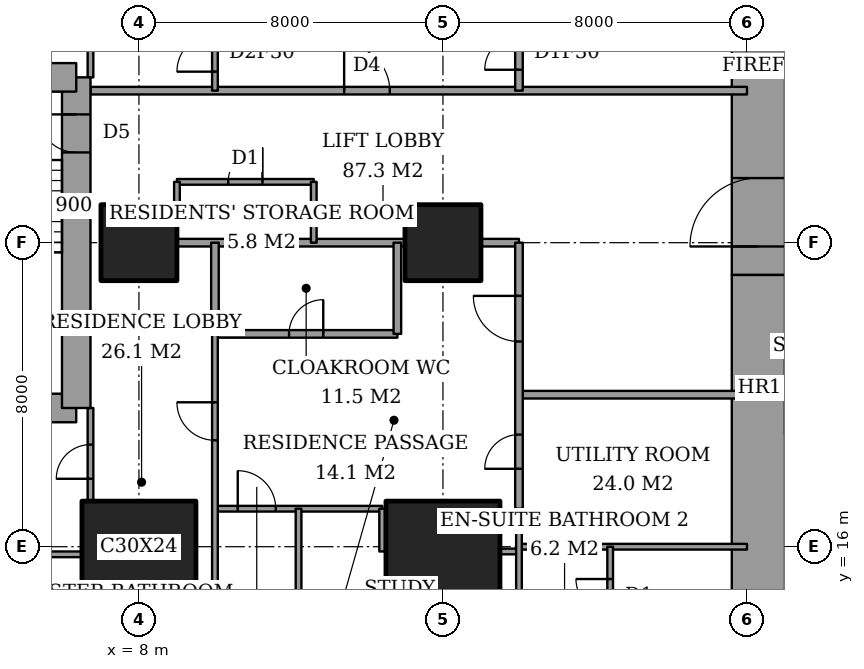
"""IFC4 building model, lengths in metres.
Left out: names, types, materials, properties, quantities, classifications, styles, units other than length and angle.
Written with IfcOpenShell. Run it as: python <this file> out.ifc"""

import sys

from ifc_helpers import new_model, si_unit, direction, frame, frame_2d, origin, origin_2d, place, context, subcontext, project, spatial, rectangle, extrude, element, fill, save


model = new_model("IFC4")
c1 = context("Model", 3, precision=1e-05, world=origin(), true_north=direction((0.0, 1.0)))
c2 = subcontext(c1, "Body", "Model", "MODEL_VIEW")
j1 = project(units=[si_unit("LENGTHUNIT", "METRE"), si_unit("PLANEANGLEUNIT", "RADIAN")], contexts=[c1])
p1 = place(None, origin())
s1 = spatial("IfcSite", under=j1, at=p1, CompositionType="ELEMENT")
p2 = place(p1, origin())
s2 = spatial("IfcBuilding", under=s1, at=p2, CompositionType="ELEMENT")
p3 = place(p2, frame((0.0, 0.0, 153.8)))
s3 = spatial("IfcBuildingStorey", under=s2, at=p3, CompositionType="ELEMENT", Elevation=153.8)
p4 = place(p3, frame((8.0, 16.0, 0.0), z_axis=(0.0, 0.0, 1.0), x_axis=(1.0, 0.0, 0.0)))
e1 = element("IfcColumn", 1, at=p4, inside=s3, PredefinedType="COLUMN", context=c2, shape_type="SweptSolid", body=[
    extrude(rectangle(XDim=3.0, YDim=2.4, at=origin_2d()), origin(), (0.0, 0.0, 1.0), 3.6),
])
p5 = place(p3, frame((8.0, 24.0, 0.0), z_axis=(0.0, 0.0, 1.0), x_axis=(1.0, 0.0, 0.0)))
e2 = element("IfcColumn", 2, at=p5, inside=s3, PredefinedType="COLUMN", context=c2, shape_type="SweptSolid", body=[
    extrude(rectangle(XDim=2.0, YDim=2.0, at=origin_2d()), origin(), (0.0, 0.0, 1.0), 3.6),
])
p6 = place(p3, frame((16.0, 16.0, 0.0), z_axis=(0.0, 0.0, 1.0), x_axis=(1.0, 0.0, 0.0)))
e3 = element("IfcColumn", 3, at=p6, inside=s3, PredefinedType="COLUMN", context=c2, shape_type="SweptSolid", body=[
    extrude(rectangle(XDim=3.0, YDim=2.4, at=origin_2d()), origin(), (0.0, 0.0, 1.0), 3.6),
])
p7 = place(p3, frame((16.0, 24.0, 0.0), z_axis=(0.0, 0.0, 1.0), x_axis=(1.0, 0.0, 0.0)))
e4 = element("IfcColumn", 4, at=p7, inside=s3, PredefinedType="COLUMN", context=c2, shape_type="SweptSolid", body=[
    extrude(rectangle(XDim=2.0, YDim=2.0, at=origin_2d()), origin(), (0.0, 0.0, 1.0), 3.6),
])
p8 = place(p3, frame((24.3, 13.0, 0.0), z_axis=(0.0, 0.0, 1.0), x_axis=(0.0, 1.0, 0.0)))
e5 = element("IfcWall", 5, at=p8, inside=s3, PredefinedType="SHEAR", context=c2, shape_type="SweptSolid", body=[
    extrude(rectangle(XDim=10.15, YDim=1.4, at=frame_2d((5.075, 0.0))), origin(), (0.0, 0.0, 1.0), 3.6),
])
p9 = place(p3, frame((24.3, 23.15, 0.0), z_axis=(0.0, 0.0, 1.0), x_axis=(0.0, 1.0, 0.0)))
e6 = element("IfcWall", 6, at=p9, inside=s3, PredefinedType="SHEAR", context=c2, shape_type="SweptSolid", body=[
    extrude(rectangle(XDim=11.85, YDim=1.4, at=frame_2d((5.925, 0.0))), origin(), (0.0, 0.0, 1.0), 3.6),
])
p10 = place(p9, frame((0.75, 0.0, 0.0)))
e7 = element("IfcOpeningElement", 7, at=p10, cuts=e6, PredefinedType="OPENING", context=c2, shape_type="SweptSolid", body=[
    extrude(rectangle(XDim=1.8, YDim=2.4, at=frame_2d((0.9, 1.2))), frame((0.0, 0.71, 0.0), z_axis=(0.0, -1.0, 0.0), x_axis=(1.0, 0.0, 0.0)), (0.0, 0.0, 1.0), 1.42),
])
p11 = place(p3, frame((1.9, 19.65, 0.0), z_axis=(0.0, 0.0, 1.0), x_axis=(1.0, 0.0, 0.0)))
e8 = element("IfcWall", 8, at=p11, inside=s3, PredefinedType="SHEAR", context=c2, shape_type="SweptSolid", body=[
    extrude(rectangle(XDim=4.45, YDim=0.75, at=frame_2d((2.225, 0.0))), origin(), (0.0, 0.0, 1.0), 3.6),
])
p12 = place(p3, frame((6.35, 19.65, 0.0), z_axis=(0.0, 0.0, 1.0), x_axis=(0.0, 1.0, 0.0)))
e9 = element("IfcWall", 9, at=p12, inside=s3, PredefinedType="SHEAR", context=c2, shape_type="SweptSolid", body=[
    extrude(rectangle(XDim=8.7, YDim=0.75, at=frame_2d((4.35, 0.0))), origin(), (0.0, 0.0, 1.0), 3.6),
])
p13 = place(p12, frame((6.725, 0.0, 0.0)))
e10 = element("IfcOpeningElement", 10, at=p13, cuts=e9, PredefinedType="OPENING", context=c2, shape_type="SweptSolid", body=[
    extrude(rectangle(XDim=1.0, YDim=2.1, at=frame_2d((0.5, 1.05))), frame((0.0, 0.385, 0.0), z_axis=(0.0, -1.0, 0.0), x_axis=(1.0, 0.0, 0.0)), (0.0, 0.0, 1.0), 0.77),
])
p14 = place(p3, frame((6.35, 28.35, 0.0), z_axis=(0.0, 0.0, 1.0), x_axis=(-1.0, 0.0, 0.0)))
e11 = element("IfcWall", 11, at=p14, inside=s3, PredefinedType="SHEAR", context=c2, shape_type="SweptSolid", body=[
    extrude(rectangle(XDim=4.45, YDim=0.75, at=frame_2d((2.225, 0.0))), origin(), (0.0, 0.0, 1.0), 3.6),
])
p15 = place(p3, frame((1.35, 15.8, 0.0), z_axis=(0.0, 0.0, 1.0), x_axis=(1.0, 0.0, 0.0)))
e12 = element("IfcWall", 12, at=p15, inside=s3, PredefinedType="PARTITIONING", context=c2, shape_type="SweptSolid", body=[
    extrude(rectangle(XDim=5.15, YDim=0.15, at=frame_2d((2.575, 0.0))), origin(), (0.0, 0.0, 1.0), 3.35),
])
p16 = place(p3, frame((17.5, 15.875, 0.0), z_axis=(0.0, 0.0, 1.0), x_axis=(1.0, 0.0, 0.0)))
e13 = element("IfcWall", 13, at=p16, inside=s3, PredefinedType="PARTITIONING", context=c2, shape_type="SweptSolid", body=[
    extrude(rectangle(XDim=0.5, YDim=0.15, at=frame_2d((0.25, 0.0))), origin(), (0.0, 0.0, 1.0), 2.634),
])
p17 = place(p3, frame((18.0, 16.0, 0.0), z_axis=(0.0, 0.0, 1.0), x_axis=(1.0, 0.0, 0.0)))
e14 = element("IfcWall", 14, at=p17, inside=s3, PredefinedType="PARTITIONING", context=c2, shape_type="SweptSolid", body=[
    extrude(rectangle(XDim=6.0, YDim=0.15, at=frame_2d((3.0, 0.0))), origin(), (0.0, 0.0, 1.0), 2.634),
])
p18 = place(p3, frame((10.0, 17.0, 0.0), z_axis=(0.0, 0.0, 1.0), x_axis=(1.0, 0.0, 0.0)))
e15 = element("IfcWall", 15, at=p18, inside=s3, PredefinedType="PARTITIONING", context=c2, shape_type="SweptSolid", body=[
    extrude(rectangle(XDim=4.4, YDim=0.15, at=frame_2d((2.2, 0.0))), origin(), (0.0, 0.0, 1.0), 3.35),
])
p19 = place(p18, frame((0.6, 0.0, 0.0)))
e16 = element("IfcOpeningElement", 16, at=p19, cuts=e15, PredefinedType="OPENING", context=c2, shape_type="SweptSolid", body=[
    extrude(rectangle(XDim=1.0, YDim=2.1, at=frame_2d((0.5, 1.05))), frame((0.0, 0.085, 0.0), z_axis=(0.0, -1.0, 0.0), x_axis=(1.0, 0.0, 0.0)), (0.0, 0.0, 1.0), 0.17),
])
p20 = place(p3, frame((18.0, 20.0, 0.0), z_axis=(0.0, 0.0, 1.0), x_axis=(1.0, 0.0, 0.0)))
e17 = element("IfcWall", 17, at=p20, inside=s3, PredefinedType="PARTITIONING", context=c2, shape_type="SweptSolid", body=[
    extrude(rectangle(XDim=6.0, YDim=0.2, at=frame_2d((3.0, 0.0))), origin(), (0.0, 0.0, 1.0), 3.35),
])
p21 = place(p3, frame((10.0, 21.6, 0.0), z_axis=(0.0, 0.0, 1.0), x_axis=(1.0, 0.0, 0.0)))
e18 = element("IfcWall", 18, at=p21, inside=s3, PredefinedType="PARTITIONING", context=c2, shape_type="SweptSolid", body=[
    extrude(rectangle(XDim=4.8, YDim=0.2, at=frame_2d((2.4, 0.0))), origin(), (0.0, 0.0, 1.0), 3.35),
])
p22 = place(p21, frame((1.95, 0.0, 0.0)))
e19 = element("IfcOpeningElement", 19, at=p22, cuts=e18, PredefinedType="OPENING", context=c2, shape_type="SweptSolid", body=[
    extrude(rectangle(XDim=0.9, YDim=2.1, at=frame_2d((0.45, 1.05))), frame((0.0, 0.11, 0.0), z_axis=(0.0, -1.0, 0.0), x_axis=(1.0, 0.0, 0.0)), (0.0, 0.0, 1.0), 0.22),
])
p23 = place(p3, frame((9.0, 24.0, 0.0), z_axis=(0.0, 0.0, 1.0), x_axis=(1.0, 0.0, 0.0)))
e20 = element("IfcWall", 20, at=p23, inside=s3, PredefinedType="PARTITIONING", context=c2, shape_type="SweptSolid", body=[
    extrude(rectangle(XDim=6.0, YDim=0.2, at=frame_2d((3.0, 0.0))), origin(), (0.0, 0.0, 1.0), 3.35),
])
p24 = place(p3, frame((17.0, 24.0, 0.0), z_axis=(0.0, 0.0, 1.0), x_axis=(1.0, 0.0, 0.0)))
e21 = element("IfcWall", 21, at=p24, inside=s3, PredefinedType="PARTITIONING", context=c2, shape_type="SweptSolid", body=[
    extrude(rectangle(XDim=1.0, YDim=0.2, at=frame_2d((0.5, 0.0))), origin(), (0.0, 0.0, 1.0), 3.35),
])
p25 = place(p3, frame((9.0, 25.6, 0.0), z_axis=(0.0, 0.0, 1.0), x_axis=(1.0, 0.0, 0.0)))
e22 = element("IfcWall", 22, at=p25, inside=s3, PredefinedType="PARTITIONING", context=c2, shape_type="SweptSolid", body=[
    extrude(rectangle(XDim=3.6, YDim=0.15, at=frame_2d((1.8, 0.0))), origin(), (0.0, 0.0, 1.0), 3.35),
])
p26 = place(p25, frame((1.35, 0.0, 0.0)))
e23 = element("IfcOpeningElement", 23, at=p26, cuts=e22, PredefinedType="OPENING", context=c2, shape_type="SweptSolid", body=[
    extrude(rectangle(XDim=0.9, YDim=2.1, at=frame_2d((0.45, 1.05))), frame((0.0, 0.085, 0.0), z_axis=(0.0, -1.0, 0.0), x_axis=(1.0, 0.0, 0.0)), (0.0, 0.0, 1.0), 0.17),
])
p27 = place(p3, frame((6.725, 28.0, 0.0), z_axis=(0.0, 0.0, 1.0), x_axis=(1.0, 0.0, 0.0)))
e24 = element("IfcWall", 24, at=p27, inside=s3, PredefinedType="PARTITIONING", context=c2, shape_type="SweptSolid", body=[
    extrude(rectangle(XDim=17.275, YDim=0.2, at=frame_2d((8.637, 0.0))), origin(), (0.0, 0.0, 1.0), 3.35),
])
p28 = place(p27, frame((6.675, 0.0, 0.0)))
e25 = element("IfcOpeningElement", 25, at=p28, cuts=e24, PredefinedType="OPENING", context=c2, shape_type="SweptSolid", body=[
    extrude(rectangle(XDim=1.2, YDim=2.4, at=frame_2d((0.6, 1.2))), frame((0.0, 0.11, 0.0), z_axis=(0.0, -1.0, 0.0), x_axis=(1.0, 0.0, 0.0)), (0.0, 0.0, 1.0), 0.22),
])
p29 = place(p3, frame((6.725, 17.2, 0.0), z_axis=(0.0, 0.0, 1.0), x_axis=(0.0, 1.0, 0.0)))
e26 = element("IfcWall", 26, at=p29, inside=s3, PredefinedType="PARTITIONING", context=c2, shape_type="SweptSolid", body=[
    extrude(rectangle(XDim=2.45, YDim=0.15, at=frame_2d((1.225, 0.0))), origin(), (0.0, 0.0, 1.0), 3.35),
])
p30 = place(p29, frame((0.587, 0.0, 0.0)))
e27 = element("IfcOpeningElement", 27, at=p30, cuts=e26, PredefinedType="OPENING", context=c2, shape_type="SweptSolid", body=[
    extrude(rectangle(XDim=0.9, YDim=2.1, at=frame_2d((0.45, 1.05))), frame((0.0, 0.085, 0.0), z_axis=(0.0, -1.0, 0.0), x_axis=(1.0, 0.0, 0.0)), (0.0, 0.0, 1.0), 0.17),
])
p31 = place(p3, frame((6.725, 28.35, 0.0), z_axis=(0.0, 0.0, 1.0), x_axis=(0.0, 1.0, 0.0)))
e28 = element("IfcWall", 28, at=p31, inside=s3, PredefinedType="PARTITIONING", context=c2, shape_type="SweptSolid", body=[
    extrude(rectangle(XDim=2.45, YDim=0.15, at=frame_2d((1.225, 0.0))), origin(), (0.0, 0.0, 1.0), 3.35),
])
p32 = place(p31, frame((0.913, 0.0, 0.0)))
e29 = element("IfcOpeningElement", 29, at=p32, cuts=e28, PredefinedType="OPENING", context=c2, shape_type="SweptSolid", body=[
    extrude(rectangle(XDim=1.0, YDim=2.1, at=frame_2d((0.5, 1.05))), frame((0.0, 0.085, 0.0), z_axis=(0.0, -1.0, 0.0), x_axis=(1.0, 0.0, 0.0)), (0.0, 0.0, 1.0), 0.17),
])
p33 = place(p3, frame((9.0, 25.0, 0.0), z_axis=(0.0, 0.0, 1.0), x_axis=(0.0, 1.0, 0.0)))
e30 = element("IfcWall", 30, at=p33, inside=s3, PredefinedType="PARTITIONING", context=c2, shape_type="SweptSolid", body=[
    extrude(rectangle(XDim=0.6, YDim=0.15, at=frame_2d((0.3, 0.0))), origin(), (0.0, 0.0, 1.0), 3.35),
])
p34 = place(p3, frame((10.0, 21.6, 0.0), z_axis=(0.0, 0.0, 1.0), x_axis=(0.0, 1.0, 0.0)))
e31 = element("IfcWall", 31, at=p34, inside=s3, PredefinedType="PARTITIONING", context=c2, shape_type="SweptSolid", body=[
    extrude(rectangle(XDim=2.4, YDim=0.2, at=frame_2d((1.2, 0.0))), origin(), (0.0, 0.0, 1.0), 3.35),
])
p35 = place(p3, frame((10.0, 14.0, 0.0), z_axis=(0.0, 0.0, 1.0), x_axis=(0.0, 1.0, 0.0)))
e32 = element("IfcWall", 32, at=p35, inside=s3, PredefinedType="PARTITIONING", context=c2, shape_type="SweptSolid", body=[
    extrude(rectangle(XDim=7.6, YDim=0.15, at=frame_2d((3.8, 0.0))), origin(), (0.0, 0.0, 1.0), 3.35),
])
p36 = place(p35, frame((4.8, 0.0, 0.0)))
e33 = element("IfcOpeningElement", 33, at=p36, cuts=e32, PredefinedType="OPENING", context=c2, shape_type="SweptSolid", body=[
    extrude(rectangle(XDim=1.0, YDim=2.1, at=frame_2d((0.5, 1.05))), frame((0.0, 0.085, 0.0), z_axis=(0.0, -1.0, 0.0), x_axis=(1.0, 0.0, 0.0)), (0.0, 0.0, 1.0), 0.17),
])
p37 = place(p3, frame((10.0, 28.0, 0.0), z_axis=(0.0, 0.0, 1.0), x_axis=(0.0, 1.0, 0.0)))
e34 = element("IfcWall", 34, at=p37, inside=s3, PredefinedType="PARTITIONING", context=c2, shape_type="SweptSolid", body=[
    extrude(rectangle(XDim=9.4, YDim=0.15, at=frame_2d((4.7, 0.0))), origin(), (0.0, 0.0, 1.0), 3.35),
])
p38 = place(p37, frame((0.5, 0.0, 0.0)))
e35 = element("IfcOpeningElement", 35, at=p38, cuts=e34, PredefinedType="OPENING", context=c2, shape_type="SweptSolid", body=[
    extrude(rectangle(XDim=1.0, YDim=2.1, at=frame_2d((0.5, 1.05))), frame((0.0, 0.085, 0.0), z_axis=(0.0, -1.0, 0.0), x_axis=(1.0, 0.0, 0.0)), (0.0, 0.0, 1.0), 0.17),
])
p39 = place(p3, frame((12.2, 10.6, 0.0), z_axis=(0.0, 0.0, 1.0), x_axis=(0.0, 1.0, 0.0)))
e36 = element("IfcWall", 36, at=p39, inside=s3, PredefinedType="PARTITIONING", context=c2, shape_type="SweptSolid", body=[
    extrude(rectangle(XDim=6.4, YDim=0.15, at=frame_2d((3.2, 0.0))), origin(), (0.0, 0.0, 1.0), 3.35),
])
p40 = place(p3, frame((12.6, 24.0, 0.0), z_axis=(0.0, 0.0, 1.0), x_axis=(0.0, 1.0, 0.0)))
e37 = element("IfcWall", 37, at=p40, inside=s3, PredefinedType="PARTITIONING", context=c2, shape_type="SweptSolid", body=[
    extrude(rectangle(XDim=1.6, YDim=0.15, at=frame_2d((0.8, 0.0))), origin(), (0.0, 0.0, 1.0), 3.35),
])
p41 = place(p3, frame((14.4, 15.875, 0.0), z_axis=(0.0, 0.0, 1.0), x_axis=(0.0, 1.0, 0.0)))
e38 = element("IfcWall", 38, at=p41, inside=s3, PredefinedType="PARTITIONING", context=c2, shape_type="SweptSolid", body=[
    extrude(rectangle(XDim=1.125, YDim=0.15, at=frame_2d((0.562, 0.0))), origin(), (0.0, 0.0, 1.0), 3.35),
])
p42 = place(p3, frame((14.8, 21.6, 0.0), z_axis=(0.0, 0.0, 1.0), x_axis=(0.0, 1.0, 0.0)))
e39 = element("IfcWall", 39, at=p42, inside=s3, PredefinedType="PARTITIONING", context=c2, shape_type="SweptSolid", body=[
    extrude(rectangle(XDim=2.4, YDim=0.2, at=frame_2d((1.2, 0.0))), origin(), (0.0, 0.0, 1.0), 3.35),
])
p43 = place(p3, frame((18.0, 17.0, 0.0), z_axis=(0.0, 0.0, 1.0), x_axis=(0.0, 1.0, 0.0)))
e40 = element("IfcWall", 40, at=p43, inside=s3, PredefinedType="PARTITIONING", context=c2, shape_type="SweptSolid", body=[
    extrude(rectangle(XDim=7.0, YDim=0.2, at=frame_2d((3.5, 0.0))), origin(), (0.0, 0.0, 1.0), 3.35),
])
p44 = place(p43, frame((4.4, 0.0, 0.0)))
e41 = element("IfcOpeningElement", 41, at=p44, cuts=e40, PredefinedType="OPENING", context=c2, shape_type="SweptSolid", body=[
    extrude(rectangle(XDim=1.2, YDim=2.4, at=frame_2d((0.6, 1.2))), frame((0.0, 0.11, 0.0), z_axis=(0.0, -1.0, 0.0), x_axis=(1.0, 0.0, 0.0)), (0.0, 0.0, 1.0), 0.22),
])
p45 = place(p43, frame((1.05, 0.0, 0.0)))
e42 = element("IfcOpeningElement", 42, at=p45, cuts=e40, PredefinedType="OPENING", context=c2, shape_type="SweptSolid", body=[
    extrude(rectangle(XDim=0.9, YDim=2.1, at=frame_2d((0.45, 1.05))), frame((0.0, 0.11, 0.0), z_axis=(0.0, -1.0, 0.0), x_axis=(1.0, 0.0, 0.0)), (0.0, 0.0, 1.0), 0.22),
])
p46 = place(p3, frame((18.0, 28.0, 0.0), z_axis=(0.0, 0.0, 1.0), x_axis=(0.0, 1.0, 0.0)))
e43 = element("IfcWall", 43, at=p46, inside=s3, PredefinedType="PARTITIONING", context=c2, shape_type="SweptSolid", body=[
    extrude(rectangle(XDim=4.0, YDim=0.2, at=frame_2d((2.0, 0.0))), origin(), (0.0, 0.0, 1.0), 3.35),
])
p47 = place(p46, frame((0.55, 0.0, 0.0)))
e44 = element("IfcOpeningElement", 44, at=p47, cuts=e43, PredefinedType="OPENING", context=c2, shape_type="SweptSolid", body=[
    extrude(rectangle(XDim=0.9, YDim=2.1, at=frame_2d((0.45, 1.05))), frame((0.0, 0.11, 0.0), z_axis=(0.0, -1.0, 0.0), x_axis=(1.0, 0.0, 0.0)), (0.0, 0.0, 1.0), 0.22),
])
p48 = place(p3, frame((18.0, 10.6, 0.0), z_axis=(0.0, 0.0, 1.0), x_axis=(0.0, 1.0, 0.0)))
e45 = element("IfcWall", 45, at=p48, inside=s3, PredefinedType="PARTITIONING", context=c2, shape_type="SweptSolid", body=[
    extrude(rectangle(XDim=6.4, YDim=0.15, at=frame_2d((3.2, 0.0))), origin(), (0.0, 0.0, 1.0), 3.35),
])
p49 = place(p3, frame((20.4, 13.4, 0.0), z_axis=(0.0, 0.0, 1.0), x_axis=(0.0, 1.0, 0.0)))
e46 = element("IfcWall", 46, at=p49, inside=s3, PredefinedType="PARTITIONING", context=c2, shape_type="SweptSolid", body=[
    extrude(rectangle(XDim=2.6, YDim=0.15, at=frame_2d((1.3, 0.0))), origin(), (0.0, 0.0, 1.0), 3.35),
])
p50 = place(p49, frame((0.85, 0.0, 0.0)))
e47 = element("IfcOpeningElement", 47, at=p50, cuts=e46, PredefinedType="OPENING", context=c2, shape_type="SweptSolid", body=[
    extrude(rectangle(XDim=0.9, YDim=2.1, at=frame_2d((0.45, 1.05))), frame((0.0, 0.085, 0.0), z_axis=(0.0, -1.0, 0.0), x_axis=(1.0, 0.0, 0.0)), (0.0, 0.0, 1.0), 0.17),
])
p51 = place(p30, origin())
e48 = element("IfcDoor", 48, at=p51, inside=s3, OperationType="SINGLE_SWING_RIGHT", PredefinedType="DOOR", context=c2, shape_type="SweptSolid", body=[
    extrude(rectangle(XDim=0.9, YDim=2.1, at=frame_2d((0.45, 1.05))), frame((0.0, 0.025, 0.0), z_axis=(0.0, -1.0, 0.0), x_axis=(1.0, 0.0, 0.0)), (0.0, 0.0, 1.0), 0.05),
])
fill(e27, e48)
p52 = place(p36, origin())
e49 = element("IfcDoor", 49, at=p52, inside=s3, OperationType="SINGLE_SWING_LEFT", PredefinedType="DOOR", context=c2, shape_type="SweptSolid", body=[
    extrude(rectangle(XDim=1.0, YDim=2.1, at=frame_2d((0.5, 1.05))), frame((0.0, 0.025, 0.0), z_axis=(0.0, -1.0, 0.0), x_axis=(1.0, 0.0, 0.0)), (0.0, 0.0, 1.0), 0.05),
])
fill(e33, e49)
p53 = place(p22, origin())
e50 = element("IfcDoor", 50, at=p53, inside=s3, OperationType="SINGLE_SWING_LEFT", PredefinedType="DOOR", context=c2, shape_type="SweptSolid", body=[
    extrude(rectangle(XDim=0.9, YDim=2.1, at=frame_2d((0.45, 1.05))), frame((0.0, 0.025, 0.0), z_axis=(0.0, -1.0, 0.0), x_axis=(1.0, 0.0, 0.0)), (0.0, 0.0, 1.0), 0.05),
])
fill(e19, e50)
p54 = place(p44, origin())
e51 = element("IfcDoor", 51, at=p54, inside=s3, OperationType="SINGLE_SWING_LEFT", PredefinedType="DOOR", context=c2, shape_type="SweptSolid", body=[
    extrude(rectangle(XDim=1.2, YDim=2.4, at=frame_2d((0.6, 1.2))), frame((0.0, 0.025, 0.0), z_axis=(0.0, -1.0, 0.0), x_axis=(1.0, 0.0, 0.0)), (0.0, 0.0, 1.0), 0.05),
])
fill(e41, e51)
p55 = place(p19, origin())
e52 = element("IfcDoor", 52, at=p55, inside=s3, OperationType="SINGLE_SWING_RIGHT", PredefinedType="DOOR", context=c2, shape_type="SweptSolid", body=[
    extrude(rectangle(XDim=1.0, YDim=2.1, at=frame_2d((0.5, 1.05))), frame((0.0, 0.025, 0.0), z_axis=(0.0, -1.0, 0.0), x_axis=(1.0, 0.0, 0.0)), (0.0, 0.0, 1.0), 0.05),
])
fill(e16, e52)
p56 = place(p50, origin())
e53 = element("IfcDoor", 53, at=p56, inside=s3, OperationType="SINGLE_SWING_LEFT", PredefinedType="DOOR", context=c2, shape_type="SweptSolid", body=[
    extrude(rectangle(XDim=0.9, YDim=2.1, at=frame_2d((0.45, 1.05))), frame((0.0, 0.025, 0.0), z_axis=(0.0, -1.0, 0.0), x_axis=(1.0, 0.0, 0.0)), (0.0, 0.0, 1.0), 0.05),
])
fill(e47, e53)
p57 = place(p45, origin())
e54 = element("IfcDoor", 54, at=p57, inside=s3, OperationType="SINGLE_SWING_RIGHT", PredefinedType="DOOR", context=c2, shape_type="SweptSolid", body=[
    extrude(rectangle(XDim=0.9, YDim=2.1, at=frame_2d((0.45, 1.05))), frame((0.0, 0.025, 0.0), z_axis=(0.0, -1.0, 0.0), x_axis=(1.0, 0.0, 0.0)), (0.0, 0.0, 1.0), 0.05),
])
fill(e42, e54)
p58 = place(p38, origin())
e55 = element("IfcDoor", 55, at=p58, inside=s3, OperationType="SINGLE_SWING_RIGHT", PredefinedType="DOOR", context=c2, shape_type="SweptSolid", body=[
    extrude(rectangle(XDim=1.0, YDim=2.1, at=frame_2d((0.5, 1.05))), frame((0.0, 0.025, 0.0), z_axis=(0.0, -1.0, 0.0), x_axis=(1.0, 0.0, 0.0)), (0.0, 0.0, 1.0), 0.05),
])
fill(e35, e55)
p59 = place(p28, origin())
e56 = element("IfcDoor", 56, at=p59, inside=s3, OperationType="SINGLE_SWING_RIGHT", PredefinedType="DOOR", context=c2, shape_type="SweptSolid", body=[
    extrude(rectangle(XDim=1.2, YDim=2.4, at=frame_2d((0.6, 1.2))), frame((0.0, 0.025, 0.0), z_axis=(0.0, -1.0, 0.0), x_axis=(1.0, 0.0, 0.0)), (0.0, 0.0, 1.0), 0.05),
])
fill(e25, e56)
p60 = place(p47, origin())
e57 = element("IfcDoor", 57, at=p60, inside=s3, OperationType="SINGLE_SWING_RIGHT", PredefinedType="DOOR", context=c2, shape_type="SweptSolid", body=[
    extrude(rectangle(XDim=0.9, YDim=2.1, at=frame_2d((0.45, 1.05))), frame((0.0, 0.025, 0.0), z_axis=(0.0, -1.0, 0.0), x_axis=(1.0, 0.0, 0.0)), (0.0, 0.0, 1.0), 0.05),
])
fill(e44, e57)
p61 = place(p26, origin())
e58 = element("IfcDoor", 58, at=p61, inside=s3, OperationType="SINGLE_SWING_LEFT", PredefinedType="DOOR", context=c2, shape_type="SweptSolid", body=[
    extrude(rectangle(XDim=0.9, YDim=2.1, at=frame_2d((0.45, 1.05))), frame((0.0, 0.025, 0.0), z_axis=(0.0, -1.0, 0.0), x_axis=(1.0, 0.0, 0.0)), (0.0, 0.0, 1.0), 0.05),
])
fill(e23, e58)
p62 = place(p10, origin())
e59 = element("IfcDoor", 59, at=p62, inside=s3, OperationType="DOUBLE_DOOR_DOUBLE_SWING", PredefinedType="DOOR", context=c2, shape_type="SweptSolid", body=[
    extrude(rectangle(XDim=1.8, YDim=2.4, at=frame_2d((0.9, 1.2))), frame((0.0, 0.025, 0.0), z_axis=(0.0, -1.0, 0.0), x_axis=(1.0, 0.0, 0.0)), (0.0, 0.0, 1.0), 0.05),
])
fill(e7, e59)
p63 = place(p13, origin())
e60 = element("IfcDoor", 60, at=p63, inside=s3, OperationType="SINGLE_SWING_LEFT", PredefinedType="DOOR", context=c2, shape_type="SweptSolid", body=[
    extrude(rectangle(XDim=1.0, YDim=2.1, at=frame_2d((0.5, 1.05))), frame((0.0, 0.025, 0.0), z_axis=(0.0, -1.0, 0.0), x_axis=(1.0, 0.0, 0.0)), (0.0, 0.0, 1.0), 0.05),
])
fill(e10, e60)
save(model, sys.argv[1])
